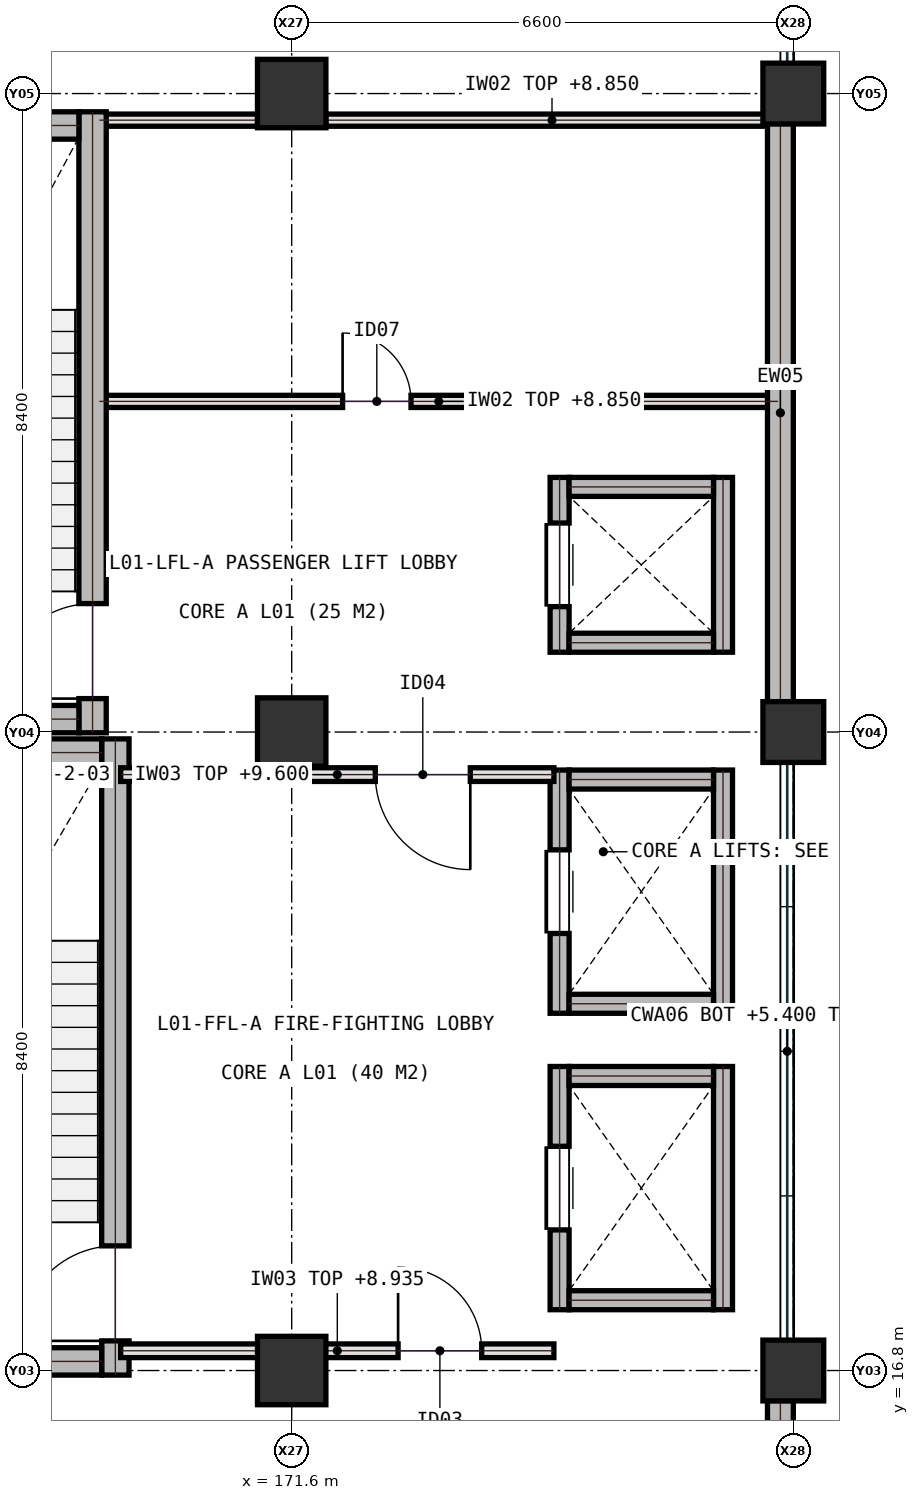
"""IFC4 building model, lengths in metres.
Left out: names, types, materials, properties, quantities, classifications, styles, units other than length and angle.
Written with IfcOpenShell. Run it as: python <this file> out.ifc"""

import sys

from ifc_helpers import new_model, si_unit, direction, frame, frame_2d, origin, origin_2d, place, context, subcontext, project, spatial, rectangle, extrude, element, fill, save


model = new_model("IFC4")
c1 = context("Model", 3, precision=1e-05, world=origin(), true_north=direction((0.0, 1.0)))
c2 = subcontext(c1, "Body", "Model", "MODEL_VIEW")
j1 = project(units=[si_unit("LENGTHUNIT", "METRE"), si_unit("PLANEANGLEUNIT", "RADIAN")], contexts=[c1])
p1 = place(None, origin())
s1 = spatial("IfcSite", under=j1, at=p1, CompositionType="ELEMENT")
p2 = place(p1, origin())
s2 = spatial("IfcBuilding", under=s1, at=p2, CompositionType="ELEMENT")
p3 = place(p2, frame((0.0, 0.0, 5.4)))
s3 = spatial("IfcBuildingStorey", under=s2, at=p3, CompositionType="ELEMENT", Elevation=5.4)
for number, where, z_axis, x_axis in (
    (1, (171.6, 16.8, 0.0), (0.0, 0.0, 1.0), (1.0, 0.0, 0.0)),
    (2, (171.6, 25.2, 0.0), (0.0, 0.0, 1.0), (1.0, 0.0, 0.0)),
    (3, (171.6, 33.6, 0.0), (0.0, 0.0, 1.0), (1.0, 0.0, 0.0)),
):
    element("IfcColumn", number, at=place(p3, frame(where, z_axis=z_axis, x_axis=x_axis)), inside=s3, PredefinedType="COLUMN", context=c2, shape_type="SweptSolid", body=[
        extrude(rectangle(XDim=0.9, YDim=0.9, at=origin_2d()), origin(), (0.0, 0.0, 1.0), 4.5),
    ])
for number, where, z_axis, x_axis in (
    (4, (178.2, 16.8, 0.0), (0.0, 0.0, 1.0), (1.0, 0.0, 0.0)),
    (5, (178.2, 25.2, 0.0), (0.0, 0.0, 1.0), (1.0, 0.0, 0.0)),
    (6, (178.2, 33.6, 0.0), (0.0, 0.0, 1.0), (1.0, 0.0, 0.0)),
):
    element("IfcColumn", number, at=place(p3, frame(where, z_axis=z_axis, x_axis=x_axis)), inside=s3, PredefinedType="COLUMN", context=c2, shape_type="SweptSolid", body=[
        extrude(rectangle(XDim=0.8, YDim=0.8, at=origin_2d()), origin(), (0.0, 0.0, 1.0), 4.5),
    ])
p4 = place(p3, frame((169.07, 29.55, 0.0), z_axis=(0.0, 0.0, 1.0), x_axis=(1.0, 0.0, 0.0)))
e7 = element("IfcWall", 7, at=p4, inside=s3, PredefinedType="PARTITIONING", context=c2, shape_type="SweptSolid", body=[
    extrude(rectangle(XDim=8.93, YDim=0.16, at=frame_2d((4.465, 0.0))), origin(), (0.0, 0.0, 1.0), 3.45),
])
p5 = place(p4, frame((3.2, 0.0, 0.0)))
e8 = element("IfcOpeningElement", 8, at=p5, cuts=e7, PredefinedType="OPENING", context=c2, shape_type="SweptSolid", body=[
    extrude(rectangle(XDim=0.9, YDim=2.1, at=frame_2d((0.45, 1.05))), frame((0.0, 0.09, 0.0), z_axis=(0.0, -1.0, 0.0), x_axis=(1.0, 0.0, 0.0)), (0.0, 0.0, 1.0), 0.18),
])
p6 = place(p3, frame((169.07, 33.25, 0.0), z_axis=(0.0, 0.0, 1.0), x_axis=(1.0, 0.0, 0.0)))
e9 = element("IfcWall", 9, at=p6, inside=s3, PredefinedType="PARTITIONING", context=c2, shape_type="SweptSolid", body=[
    extrude(rectangle(XDim=2.08, YDim=0.16, at=frame_2d((1.04, 0.0))), origin(), (0.0, 0.0, 1.0), 3.45),
])
p7 = place(p3, frame((172.05, 33.25, 0.0), z_axis=(0.0, 0.0, 1.0), x_axis=(1.0, 0.0, 0.0)))
e10 = element("IfcWall", 10, at=p7, inside=s3, PredefinedType="PARTITIONING", context=c2, shape_type="SweptSolid", body=[
    extrude(rectangle(XDim=5.95, YDim=0.16, at=frame_2d((2.975, 0.0))), origin(), (0.0, 0.0, 1.0), 3.45),
])
for number, where, z_axis, x_axis in (
    (11, (178.03, 8.795, 0.0), (0.0, 0.0, 1.0), (0.0, 1.0, 0.0)),
    (12, (178.03, 25.595, 0.0), (0.0, 0.0, 1.0), (0.0, 1.0, 0.0)),
):
    element("IfcWall", number, at=place(p3, frame(where, z_axis=z_axis, x_axis=x_axis)), inside=s3, PredefinedType="SHEAR", context=c2, shape_type="SweptSolid", body=[
        extrude(rectangle(XDim=7.61, YDim=0.34, at=frame_2d((3.805, 0.0))), origin(), (0.0, 0.0, 1.0), 4.2),
    ])
p8 = place(p3, frame((169.28, 16.74, 0.0), z_axis=(0.0, 0.0, 1.0), x_axis=(0.0, 1.0, 0.0)))
e13 = element("IfcWall", 13, at=p8, inside=s3, PredefinedType="SHEAR", context=c2, shape_type="SweptSolid", body=[
    extrude(rectangle(XDim=8.37, YDim=0.36, at=frame_2d((4.185, 0.0))), origin(), (0.0, 0.0, 1.0), 4.2),
])
p9 = place(p8, frame((0.45, 0.0, 0.0)))
e14 = element("IfcOpeningElement", 14, at=p9, cuts=e13, PredefinedType="OPENING", context=c2, shape_type="SweptSolid", body=[
    extrude(rectangle(XDim=1.25, YDim=2.15, at=frame_2d((0.625, 1.075))), frame((0.0, 0.19, 0.0), z_axis=(0.0, -1.0, 0.0), x_axis=(1.0, 0.0, 0.0)), (0.0, 0.0, 1.0), 0.38),
])
for number, where, z_axis, x_axis in (
    (15, (165.6, 24.93, 0.0), (0.0, 0.0, 1.0), (1.0, 0.0, 0.0)),
    (16, (165.6, 16.92, 0.0), (0.0, 0.0, 1.0), (1.0, 0.0, 0.0)),
):
    element("IfcWall", number, at=place(p3, frame(where, z_axis=z_axis, x_axis=x_axis)), inside=s3, PredefinedType="SHEAR", context=c2, shape_type="SweptSolid", body=[
        extrude(rectangle(XDim=3.5, YDim=0.36, at=frame_2d((1.75, 0.0))), origin(), (0.0, 0.0, 1.0), 4.2),
    ])
p10 = place(p3, frame((168.98, 25.19, 0.0), z_axis=(0.0, 0.0, 1.0), x_axis=(0.0, 1.0, 0.0)))
e17 = element("IfcWall", 17, at=p10, inside=s3, PredefinedType="SHEAR", context=c2, shape_type="SweptSolid", body=[
    extrude(rectangle(XDim=8.17, YDim=0.36, at=frame_2d((4.085, 0.0))), origin(), (0.0, 0.0, 1.0), 4.2),
])
p11 = place(p10, frame((0.45, 0.0, 0.0)))
e18 = element("IfcOpeningElement", 18, at=p11, cuts=e17, PredefinedType="OPENING", context=c2, shape_type="SweptSolid", body=[
    extrude(rectangle(XDim=1.25, YDim=2.15, at=frame_2d((0.625, 1.075))), frame((0.0, 0.19, 0.0), z_axis=(0.0, -1.0, 0.0), x_axis=(1.0, 0.0, 0.0)), (0.0, 0.0, 1.0), 0.38),
])
for number, where, z_axis, x_axis in (
    (19, (165.6, 33.18, 0.0), (0.0, 0.0, 1.0), (1.0, 0.0, 0.0)),
    (20, (165.6, 25.37, 0.0), (0.0, 0.0, 1.0), (1.0, 0.0, 0.0)),
):
    element("IfcWall", number, at=place(p3, frame(where, z_axis=z_axis, x_axis=x_axis)), inside=s3, PredefinedType="SHEAR", context=c2, shape_type="SweptSolid", body=[
        extrude(rectangle(XDim=3.2, YDim=0.36, at=frame_2d((1.6, 0.0))), origin(), (0.0, 0.0, 1.0), 4.2),
    ])
p12 = place(p3, frame((175.125, 17.6, 0.0), z_axis=(0.0, 0.0, 1.0), x_axis=(0.0, 1.0, 0.0)))
e21 = element("IfcWall", 21, at=p12, inside=s3, PredefinedType="SHEAR", context=c2, shape_type="SweptSolid", body=[
    extrude(rectangle(XDim=3.2, YDim=0.25, at=frame_2d((1.6, 0.0))), origin(), (0.0, 0.0, 1.0), 4.2),
])
p13 = place(p12, frame((1.05, 0.0, 0.0)))
e22 = element("IfcOpeningElement", 22, at=p13, cuts=e21, PredefinedType="OPENING", context=c2, shape_type="SweptSolid", body=[
    extrude(rectangle(XDim=1.1, YDim=2.15, at=frame_2d((0.55, 1.075))), frame((0.0, 0.135, 0.0), z_axis=(0.0, -1.0, 0.0), x_axis=(1.0, 0.0, 0.0)), (0.0, 0.0, 1.0), 0.27),
])
p14 = place(p3, frame((177.275, 17.6, 0.0), z_axis=(0.0, 0.0, 1.0), x_axis=(0.0, 1.0, 0.0)))
e23 = element("IfcWall", 23, at=p14, inside=s3, PredefinedType="SHEAR", context=c2, shape_type="SweptSolid", body=[
    extrude(rectangle(XDim=3.2, YDim=0.25, at=frame_2d((1.6, 0.0))), origin(), (0.0, 0.0, 1.0), 4.2),
])
for number, where, z_axis, x_axis in (
    (24, (175.25, 17.725, 0.0), (0.0, 0.0, 1.0), (1.0, 0.0, 0.0)),
    (25, (175.25, 20.675, 0.0), (0.0, 0.0, 1.0), (1.0, 0.0, 0.0)),
):
    element("IfcWall", number, at=place(p3, frame(where, z_axis=z_axis, x_axis=x_axis)), inside=s3, PredefinedType="SHEAR", context=c2, shape_type="SweptSolid", body=[
        extrude(rectangle(XDim=1.9, YDim=0.25, at=frame_2d((0.95, 0.0))), origin(), (0.0, 0.0, 1.0), 4.2),
    ])
p15 = place(p3, frame((175.125, 21.5, 0.0), z_axis=(0.0, 0.0, 1.0), x_axis=(0.0, 1.0, 0.0)))
e26 = element("IfcWall", 26, at=p15, inside=s3, PredefinedType="SHEAR", context=c2, shape_type="SweptSolid", body=[
    extrude(rectangle(XDim=3.2, YDim=0.25, at=frame_2d((1.6, 0.0))), origin(), (0.0, 0.0, 1.0), 4.2),
])
p16 = place(p15, frame((1.05, 0.0, 0.0)))
e27 = element("IfcOpeningElement", 27, at=p16, cuts=e26, PredefinedType="OPENING", context=c2, shape_type="SweptSolid", body=[
    extrude(rectangle(XDim=1.1, YDim=2.15, at=frame_2d((0.55, 1.075))), frame((0.0, 0.135, 0.0), z_axis=(0.0, -1.0, 0.0), x_axis=(1.0, 0.0, 0.0)), (0.0, 0.0, 1.0), 0.27),
])
p17 = place(p3, frame((177.275, 21.5, 0.0), z_axis=(0.0, 0.0, 1.0), x_axis=(0.0, 1.0, 0.0)))
e28 = element("IfcWall", 28, at=p17, inside=s3, PredefinedType="SHEAR", context=c2, shape_type="SweptSolid", body=[
    extrude(rectangle(XDim=3.2, YDim=0.25, at=frame_2d((1.6, 0.0))), origin(), (0.0, 0.0, 1.0), 4.2),
])
for number, where, z_axis, x_axis in (
    (29, (175.25, 21.625, 0.0), (0.0, 0.0, 1.0), (1.0, 0.0, 0.0)),
    (30, (175.25, 24.575, 0.0), (0.0, 0.0, 1.0), (1.0, 0.0, 0.0)),
):
    element("IfcWall", number, at=place(p3, frame(where, z_axis=z_axis, x_axis=x_axis)), inside=s3, PredefinedType="SHEAR", context=c2, shape_type="SweptSolid", body=[
        extrude(rectangle(XDim=1.9, YDim=0.25, at=frame_2d((0.95, 0.0))), origin(), (0.0, 0.0, 1.0), 4.2),
    ])
p18 = place(p3, frame((175.125, 26.25, 0.0), z_axis=(0.0, 0.0, 1.0), x_axis=(0.0, 1.0, 0.0)))
e31 = element("IfcWall", 31, at=p18, inside=s3, PredefinedType="SHEAR", context=c2, shape_type="SweptSolid", body=[
    extrude(rectangle(XDim=2.3, YDim=0.25, at=frame_2d((1.15, 0.0))), origin(), (0.0, 0.0, 1.0), 4.2),
])
p19 = place(p18, frame((0.6, 0.0, 0.0)))
e32 = element("IfcOpeningElement", 32, at=p19, cuts=e31, PredefinedType="OPENING", context=c2, shape_type="SweptSolid", body=[
    extrude(rectangle(XDim=1.1, YDim=2.15, at=frame_2d((0.55, 1.075))), frame((0.0, 0.135, 0.0), z_axis=(0.0, -1.0, 0.0), x_axis=(1.0, 0.0, 0.0)), (0.0, 0.0, 1.0), 0.27),
])
p20 = place(p3, frame((177.275, 26.25, 0.0), z_axis=(0.0, 0.0, 1.0), x_axis=(0.0, 1.0, 0.0)))
e33 = element("IfcWall", 33, at=p20, inside=s3, PredefinedType="SHEAR", context=c2, shape_type="SweptSolid", body=[
    extrude(rectangle(XDim=2.3, YDim=0.25, at=frame_2d((1.15, 0.0))), origin(), (0.0, 0.0, 1.0), 4.2),
])
for number, where, z_axis, x_axis in (
    (34, (175.25, 26.375, 0.0), (0.0, 0.0, 1.0), (1.0, 0.0, 0.0)),
    (35, (175.25, 28.425, 0.0), (0.0, 0.0, 1.0), (1.0, 0.0, 0.0)),
):
    element("IfcWall", number, at=place(p3, frame(where, z_axis=z_axis, x_axis=x_axis)), inside=s3, PredefinedType="SHEAR", context=c2, shape_type="SweptSolid", body=[
        extrude(rectangle(XDim=1.9, YDim=0.25, at=frame_2d((0.95, 0.0))), origin(), (0.0, 0.0, 1.0), 4.2),
    ])
p21 = place(p3, frame((169.35, 24.64, 0.0), z_axis=(0.0, 0.0, 1.0), x_axis=(1.0, 0.0, 0.0)))
e36 = element("IfcWall", 36, at=p21, inside=s3, PredefinedType="SOLIDWALL", context=c2, shape_type="SweptSolid", body=[
    extrude(rectangle(XDim=5.7, YDim=0.18, at=frame_2d((2.85, 0.0))), origin(), (0.0, 0.0, 1.0), 4.2),
])
p22 = place(p21, frame((3.35, 0.0, 0.0)))
e37 = element("IfcOpeningElement", 37, at=p22, cuts=e36, PredefinedType="OPENING", context=c2, shape_type="SweptSolid", body=[
    extrude(rectangle(XDim=1.25, YDim=2.15, at=frame_2d((0.625, 1.075))), frame((0.0, 0.1, 0.0), z_axis=(0.0, -1.0, 0.0), x_axis=(1.0, 0.0, 0.0)), (0.0, 0.0, 1.0), 0.2),
])
p23 = place(p3, frame((169.35, 17.06, 0.0), z_axis=(0.0, 0.0, 1.0), x_axis=(1.0, 0.0, 0.0)))
e38 = element("IfcWall", 38, at=p23, inside=s3, PredefinedType="SOLIDWALL", context=c2, shape_type="SweptSolid", body=[
    extrude(rectangle(XDim=5.7, YDim=0.18, at=frame_2d((2.85, 0.0))), origin(), (0.0, 0.0, 1.0), 3.535),
])
p24 = place(p23, frame((3.65, 0.0, 0.0)))
e39 = element("IfcOpeningElement", 39, at=p24, cuts=e38, PredefinedType="OPENING", context=c2, shape_type="SweptSolid", body=[
    extrude(rectangle(XDim=1.1, YDim=2.15, at=frame_2d((0.55, 1.075))), frame((0.0, 0.1, 0.0), z_axis=(0.0, -1.0, 0.0), x_axis=(1.0, 0.0, 0.0)), (0.0, 0.0, 1.0), 0.2),
])
p25 = place(p5, origin())
e40 = element("IfcDoor", 40, at=p25, inside=s3, OperationType="SINGLE_SWING_LEFT", PredefinedType="DOOR", context=c2, shape_type="SweptSolid", body=[
    extrude(rectangle(XDim=0.9, YDim=2.1, at=frame_2d((0.45, 1.05))), frame((0.0, 0.025, 0.0), z_axis=(0.0, -1.0, 0.0), x_axis=(1.0, 0.0, 0.0)), (0.0, 0.0, 1.0), 0.05),
])
fill(e8, e40)
p26 = place(p9, origin())
e41 = element("IfcDoor", 41, at=p26, inside=s3, OperationType="SINGLE_SWING_LEFT", PredefinedType="DOOR", context=c2, shape_type="SweptSolid", body=[
    extrude(rectangle(XDim=1.25, YDim=2.15, at=frame_2d((0.625, 1.075))), frame((0.0, 0.025, 0.0), z_axis=(0.0, -1.0, 0.0), x_axis=(1.0, 0.0, 0.0)), (0.0, 0.0, 1.0), 0.05),
])
fill(e14, e41)
p27 = place(p11, origin())
e42 = element("IfcDoor", 42, at=p27, inside=s3, OperationType="SINGLE_SWING_LEFT", PredefinedType="DOOR", context=c2, shape_type="SweptSolid", body=[
    extrude(rectangle(XDim=1.25, YDim=2.15, at=frame_2d((0.625, 1.075))), frame((0.0, 0.025, 0.0), z_axis=(0.0, -1.0, 0.0), x_axis=(1.0, 0.0, 0.0)), (0.0, 0.0, 1.0), 0.05),
])
fill(e18, e42)
p28 = place(p13, origin())
e43 = element("IfcDoor", 43, at=p28, inside=s3, OperationType="SLIDING_TO_LEFT", PredefinedType="DOOR", context=c2, shape_type="SweptSolid", body=[
    extrude(rectangle(XDim=1.1, YDim=2.15, at=frame_2d((0.55, 1.075))), frame((0.0, 0.025, 0.0), z_axis=(0.0, -1.0, 0.0), x_axis=(1.0, 0.0, 0.0)), (0.0, 0.0, 1.0), 0.05),
])
fill(e22, e43)
p29 = place(p16, origin())
e44 = element("IfcDoor", 44, at=p29, inside=s3, OperationType="SLIDING_TO_LEFT", PredefinedType="DOOR", context=c2, shape_type="SweptSolid", body=[
    extrude(rectangle(XDim=1.1, YDim=2.15, at=frame_2d((0.55, 1.075))), frame((0.0, 0.025, 0.0), z_axis=(0.0, -1.0, 0.0), x_axis=(1.0, 0.0, 0.0)), (0.0, 0.0, 1.0), 0.05),
])
fill(e27, e44)
p30 = place(p19, origin())
e45 = element("IfcDoor", 45, at=p30, inside=s3, OperationType="SLIDING_TO_LEFT", PredefinedType="DOOR", context=c2, shape_type="SweptSolid", body=[
    extrude(rectangle(XDim=1.1, YDim=2.15, at=frame_2d((0.55, 1.075))), frame((0.0, 0.025, 0.0), z_axis=(0.0, -1.0, 0.0), x_axis=(1.0, 0.0, 0.0)), (0.0, 0.0, 1.0), 0.05),
])
fill(e32, e45)
p31 = place(p22, frame((1.25, 0.0, 0.0), z_axis=(0.0, 0.0, 1.0), x_axis=(-1.0, 0.0, 0.0)))
e46 = element("IfcDoor", 46, at=p31, inside=s3, OperationType="SINGLE_SWING_RIGHT", PredefinedType="DOOR", context=c2, shape_type="SweptSolid", body=[
    extrude(rectangle(XDim=1.25, YDim=2.15, at=frame_2d((0.625, 1.075))), frame((0.0, 0.025, 0.0), z_axis=(0.0, -1.0, 0.0), x_axis=(1.0, 0.0, 0.0)), (0.0, 0.0, 1.0), 0.05),
])
fill(e37, e46)
p32 = place(p24, origin())
e47 = element("IfcDoor", 47, at=p32, inside=s3, OperationType="SINGLE_SWING_LEFT", PredefinedType="DOOR", context=c2, shape_type="SweptSolid", body=[
    extrude(rectangle(XDim=1.1, YDim=2.15, at=frame_2d((0.55, 1.075))), frame((0.0, 0.025, 0.0), z_axis=(0.0, -1.0, 0.0), x_axis=(1.0, 0.0, 0.0)), (0.0, 0.0, 1.0), 0.05),
])
fill(e39, e47)
save(model, sys.argv[1])
